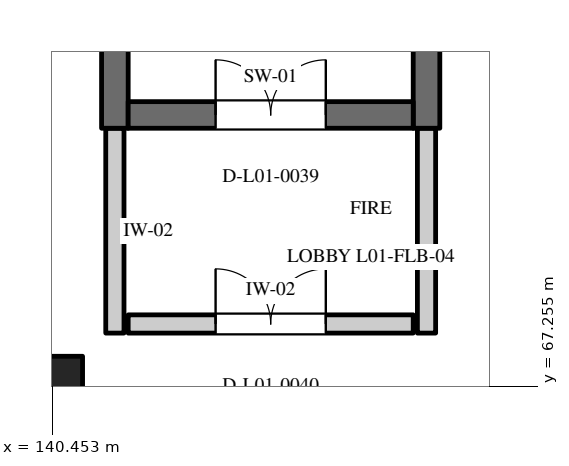
"""IFC4 building model, lengths in metres.
Left out: names, types, materials, properties, quantities, classifications, styles, units other than length and angle.
Written with IfcOpenShell. Run it as: python <this file> out.ifc"""

import sys

from ifc_helpers import new_model, si_unit, direction, frame, frame_2d, origin, origin_2d, place, context, subcontext, project, spatial, rectangle, extrude, element, fill, save


model = new_model("IFC4")
c1 = context("Model", 3, precision=1e-05, world=origin(), true_north=direction((0.0, 1.0)))
c2 = subcontext(c1, "Body", "Model", "MODEL_VIEW")
j1 = project(units=[si_unit("LENGTHUNIT", "METRE"), si_unit("PLANEANGLEUNIT", "RADIAN")], contexts=[c1])
p1 = place(None, origin())
s1 = spatial("IfcSite", under=j1, at=p1, CompositionType="ELEMENT")
p2 = place(p1, origin())
s2 = spatial("IfcBuilding", under=s1, at=p2, CompositionType="ELEMENT")
p3 = place(p2, frame((0.0, 0.0, 4.8)))
s3 = spatial("IfcBuildingStorey", under=s2, at=p3, CompositionType="ELEMENT", Elevation=4.8)
p4 = place(p3, frame((140.4, 67.2, 0.0), z_axis=(0.0, 0.0, 1.0), x_axis=(1.0, 0.0, 0.0)))
e1 = element("IfcColumn", 1, at=p4, inside=s3, PredefinedType="COLUMN", context=c2, shape_type="SweptSolid", body=[
    extrude(rectangle(XDim=0.9, YDim=0.9, at=origin_2d()), origin(), (0.0, 0.0, 1.0), 4.8),
])
for number, where, z_axis, x_axis in (
    (2, (141.275, 70.65, 0.0), (0.0, 0.0, 1.0), (0.0, 1.0, 0.0)),
    (3, (145.375, 70.65, 0.0), (0.0, 0.0, 1.0), (0.0, 1.0, 0.0)),
):
    element("IfcWall", number, at=place(p3, frame(where, z_axis=z_axis, x_axis=x_axis)), inside=s3, PredefinedType="SHEAR", context=c2, shape_type="SweptSolid", body=[
        extrude(rectangle(XDim=10.5, YDim=0.35, at=frame_2d((5.25, 0.0))), origin(), (0.0, 0.0, 1.0), 4.8),
    ])
p5 = place(p3, frame((141.45, 70.825, 0.0), z_axis=(0.0, 0.0, 1.0), x_axis=(1.0, 0.0, 0.0)))
e4 = element("IfcWall", 4, at=p5, inside=s3, PredefinedType="SHEAR", context=c2, shape_type="SweptSolid", body=[
    extrude(rectangle(XDim=3.75, YDim=0.35, at=frame_2d((1.875, 0.0))), origin(), (0.0, 0.0, 1.0), 4.45),
])
p6 = place(p5, frame((1.15, 0.0, 0.0)))
e5 = element("IfcOpeningElement", 5, at=p6, cuts=e4, PredefinedType="OPENING", context=c2, shape_type="SweptSolid", body=[
    extrude(rectangle(XDim=1.45, YDim=2.2, at=frame_2d((0.725, 1.1))), frame((0.0, 0.187, 0.0), z_axis=(0.0, -1.0, 0.0), x_axis=(1.0, 0.0, 0.0)), (0.0, 0.0, 1.0), 0.374),
])
for number, where, z_axis, x_axis in (
    (6, (141.275, 67.955, 0.0), (0.0, 0.0, 1.0), (0.0, 1.0, 0.0)),
    (7, (145.375, 67.955, 0.0), (0.0, 0.0, 1.0), (0.0, 1.0, 0.0)),
):
    element("IfcWall", number, at=place(p3, frame(where, z_axis=z_axis, x_axis=x_axis)), inside=s3, PredefinedType="STANDARD", context=c2, shape_type="SweptSolid", body=[
        extrude(rectangle(XDim=2.695, YDim=0.24, at=frame_2d((1.347, 0.0))), origin(), (0.0, 0.0, 1.0), 4.45),
    ])
p7 = place(p3, frame((141.45, 68.075, 0.0), z_axis=(0.0, 0.0, 1.0), x_axis=(1.0, 0.0, 0.0)))
e8 = element("IfcWall", 8, at=p7, inside=s3, PredefinedType="STANDARD", context=c2, shape_type="SweptSolid", body=[
    extrude(rectangle(XDim=3.75, YDim=0.24, at=frame_2d((1.875, 0.0))), origin(), (0.0, 0.0, 1.0), 4.45),
])
p8 = place(p7, frame((1.15, 0.0, 0.0)))
e9 = element("IfcOpeningElement", 9, at=p8, cuts=e8, PredefinedType="OPENING", context=c2, shape_type="SweptSolid", body=[
    extrude(rectangle(XDim=1.45, YDim=2.2, at=frame_2d((0.725, 1.1))), frame((0.0, 0.132, 0.0), z_axis=(0.0, -1.0, 0.0), x_axis=(1.0, 0.0, 0.0)), (0.0, 0.0, 1.0), 0.264),
])
p9 = place(p6, origin())
e10 = element("IfcDoor", 10, at=p9, inside=s3, OperationType="DOUBLE_DOOR_SINGLE_SWING", PredefinedType="DOOR", context=c2, shape_type="SweptSolid", body=[
    extrude(rectangle(XDim=1.45, YDim=2.2, at=frame_2d((0.725, 1.1))), frame((0.0, 0.025, 0.0), z_axis=(0.0, -1.0, 0.0), x_axis=(1.0, 0.0, 0.0)), (0.0, 0.0, 1.0), 0.05),
])
fill(e5, e10)
p10 = place(p8, origin())
e11 = element("IfcDoor", 11, at=p10, inside=s3, OperationType="DOUBLE_DOOR_SINGLE_SWING", PredefinedType="DOOR", context=c2, shape_type="SweptSolid", body=[
    extrude(rectangle(XDim=1.45, YDim=2.2, at=frame_2d((0.725, 1.1))), frame((0.0, 0.025, 0.0), z_axis=(0.0, -1.0, 0.0), x_axis=(1.0, 0.0, 0.0)), (0.0, 0.0, 1.0), 0.05),
])
fill(e9, e11)
save(model, sys.argv[1])
